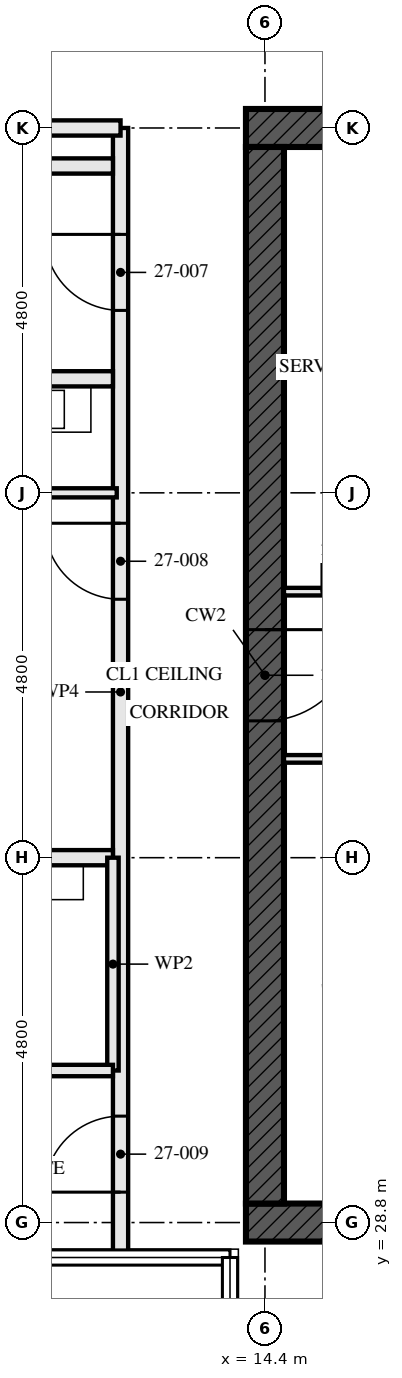
"""IFC4 building model, lengths in metres.
Left out: names, types, materials, properties, quantities, classifications, styles, units other than length and angle.
Written with IfcOpenShell. Run it as: python <this file> out.ifc"""

import sys

from ifc_helpers import new_model, si_unit, direction, frame, frame_2d, origin, place, context, subcontext, project, spatial, rectangle, extrude, element, fill, save


model = new_model("IFC4")
c1 = context("Model", 3, precision=1e-05, world=origin(), true_north=direction((0.0, 1.0)))
c2 = subcontext(c1, "Body", "Model", "MODEL_VIEW")
j1 = project(units=[si_unit("LENGTHUNIT", "METRE"), si_unit("PLANEANGLEUNIT", "RADIAN")], contexts=[c1])
p1 = place(None, origin())
s1 = spatial("IfcSite", under=j1, at=p1, CompositionType="ELEMENT")
p2 = place(p1, origin())
s2 = spatial("IfcBuilding", under=s1, at=p2, CompositionType="ELEMENT")
p3 = place(p2, frame((0.0, 0.0, 101.5)))
s3 = spatial("IfcBuildingStorey", under=s2, at=p3, CompositionType="ELEMENT", Elevation=101.5)
p4 = place(p3, frame((14.15, 28.8, -0.17), z_axis=(0.0, 0.0, 1.0), x_axis=(1.0, 0.0, 0.0)))
e1 = element("IfcWall", 1, at=p4, inside=s3, PredefinedType="SHEAR", context=c2, shape_type="SweptSolid", body=[
    extrude(rectangle(XDim=14.9, YDim=0.5, at=frame_2d((7.45, 0.0))), origin(), (0.0, 0.0, 1.0), 3.5),
])
p5 = place(p4, frame((6.85, 0.0, 0.17)))
e2 = element("IfcOpeningElement", 2, at=p5, cuts=e1, PredefinedType="OPENING", context=c2, shape_type="SweptSolid", body=[
    extrude(rectangle(XDim=1.2, YDim=2.1, at=frame_2d((0.6, 1.05))), frame((0.0, 0.26, 0.0), z_axis=(0.0, -1.0, 0.0), x_axis=(1.0, 0.0, 0.0)), (0.0, 0.0, 1.0), 0.521),
])
p6 = place(p3, frame((29.05, 43.2, -0.17), z_axis=(0.0, 0.0, 1.0), x_axis=(-1.0, 0.0, 0.0)))
e3 = element("IfcWall", 3, at=p6, inside=s3, PredefinedType="SHEAR", context=c2, shape_type="SweptSolid", body=[
    extrude(rectangle(XDim=14.9, YDim=0.5, at=frame_2d((7.45, 0.0))), origin(), (0.0, 0.0, 1.0), 3.5),
])
p7 = place(p6, frame((6.85, 0.0, 0.17)))
e4 = element("IfcOpeningElement", 4, at=p7, cuts=e3, PredefinedType="OPENING", context=c2, shape_type="SweptSolid", body=[
    extrude(rectangle(XDim=1.2, YDim=2.1, at=frame_2d((0.6, 1.05))), frame((0.0, 0.26, 0.0), z_axis=(0.0, -1.0, 0.0), x_axis=(1.0, 0.0, 0.0)), (0.0, 0.0, 1.0), 0.521),
])
p8 = place(p3, frame((14.4, 42.95, -0.17), z_axis=(0.0, 0.0, 1.0), x_axis=(0.0, -1.0, 0.0)))
e5 = element("IfcWall", 5, at=p8, inside=s3, PredefinedType="SHEAR", context=c2, shape_type="SweptSolid", body=[
    extrude(rectangle(XDim=13.9, YDim=0.5, at=frame_2d((6.95, 0.0))), origin(), (0.0, 0.0, 1.0), 3.5),
])
p9 = place(p8, frame((6.35, 0.0, 0.17)))
e6 = element("IfcOpeningElement", 6, at=p9, cuts=e5, PredefinedType="OPENING", context=c2, shape_type="SweptSolid", body=[
    extrude(rectangle(XDim=1.2, YDim=2.1, at=frame_2d((0.6, 1.05))), frame((0.0, 0.26, 0.0), z_axis=(0.0, -1.0, 0.0), x_axis=(1.0, 0.0, 0.0)), (0.0, 0.0, 1.0), 0.521),
])
for number, where, z_axis, x_axis in (
    (7, (7.7, 42.7, 0.0), (0.0, 0.0, 1.0), (1.0, 0.0, 0.0)),
    (8, (7.7, 39.9, 0.0), (0.0, 0.0, 1.0), (1.0, 0.0, 0.0)),
):
    element("IfcWall", number, at=place(p3, frame(where, z_axis=z_axis, x_axis=x_axis)), inside=s3, PredefinedType="SOLIDWALL", context=c2, shape_type="SweptSolid", body=[
        extrude(rectangle(XDim=4.7, YDim=0.2, at=frame_2d((2.35, 0.0))), origin(), (0.0, 0.0, 1.0), 2.99),
    ])
p10 = place(p3, frame((7.8, 38.4, 0.0), z_axis=(0.0, 0.0, 1.0), x_axis=(1.0, 0.0, 0.0)))
e9 = element("IfcWall", 9, at=p10, inside=s3, PredefinedType="PARTITIONING", context=c2, shape_type="SweptSolid", body=[
    extrude(rectangle(XDim=4.65, YDim=0.12, at=frame_2d((2.325, 0.0))), origin(), (0.0, 0.0, 1.0), 2.55),
])
p11 = place(p10, frame((1.875, 0.0, 0.0)))
e10 = element("IfcOpeningElement", 10, at=p11, cuts=e9, PredefinedType="OPENING", context=c2, shape_type="SweptSolid", body=[
    extrude(rectangle(XDim=0.9, YDim=2.1, at=frame_2d((0.45, 1.05))), frame((0.0, 0.071, 0.0), z_axis=(0.0, -1.0, 0.0), x_axis=(1.0, 0.0, 0.0)), (0.0, 0.0, 1.0), 0.141),
])
p12 = place(p3, frame((5.145, 33.6, 0.0), z_axis=(0.0, 0.0, 1.0), x_axis=(1.0, 0.0, 0.0)))
e11 = element("IfcWall", 11, at=p12, inside=s3, PredefinedType="PARTITIONING", context=c2, shape_type="SweptSolid", body=[
    extrude(rectangle(XDim=7.255, YDim=0.2, at=frame_2d((3.627, 0.0))), origin(), (0.0, 0.0, 1.0), 2.55),
])
p13 = place(p3, frame((9.4, 30.8, 0.0), z_axis=(0.0, 0.0, 1.0), x_axis=(1.0, 0.0, 0.0)))
e12 = element("IfcWall", 12, at=p13, inside=s3, PredefinedType="PARTITIONING", context=c2, shape_type="SweptSolid", body=[
    extrude(rectangle(XDim=3.0, YDim=0.15, at=frame_2d((1.5, 0.0))), origin(), (0.0, 0.0, 1.0), 3.33),
])
p14 = place(p3, frame((12.4, 33.6, 0.0), z_axis=(0.0, 0.0, 1.0), x_axis=(0.0, -1.0, 0.0)))
e13 = element("IfcWall", 13, at=p14, inside=s3, PredefinedType="PARTITIONING", context=c2, shape_type="SweptSolid", body=[
    extrude(rectangle(XDim=2.8, YDim=0.15, at=frame_2d((1.4, 0.0))), origin(), (0.0, 0.0, 1.0), 3.33),
])
p15 = place(p3, frame((12.5, 43.2, 0.0), z_axis=(0.0, 0.0, 1.0), x_axis=(0.0, -1.0, 0.0)))
e14 = element("IfcWall", 14, at=p15, inside=s3, PredefinedType="PARTITIONING", context=c2, shape_type="SweptSolid", body=[
    extrude(rectangle(XDim=14.84, YDim=0.2, at=frame_2d((7.42, 0.0))), origin(), (0.0, 0.0, 1.0), 2.32),
])
p16 = place(p15, frame((1.4, 0.0, 0.0)))
e15 = element("IfcOpeningElement", 15, at=p16, cuts=e14, PredefinedType="OPENING", context=c2, shape_type="SweptSolid", body=[
    extrude(rectangle(XDim=1.0, YDim=2.1, at=frame_2d((0.5, 1.05))), frame((0.0, 0.111, 0.0), z_axis=(0.0, -1.0, 0.0), x_axis=(1.0, 0.0, 0.0)), (0.0, 0.0, 1.0), 0.221),
])
p17 = place(p15, frame((5.2, 0.0, 0.0)))
e16 = element("IfcOpeningElement", 16, at=p17, cuts=e14, PredefinedType="OPENING", context=c2, shape_type="SweptSolid", body=[
    extrude(rectangle(XDim=1.0, YDim=2.1, at=frame_2d((0.5, 1.05))), frame((0.0, 0.111, 0.0), z_axis=(0.0, -1.0, 0.0), x_axis=(1.0, 0.0, 0.0)), (0.0, 0.0, 1.0), 0.221),
])
p18 = place(p15, frame((13.0, 0.0, 0.0)))
e17 = element("IfcOpeningElement", 17, at=p18, cuts=e14, PredefinedType="OPENING", context=c2, shape_type="SweptSolid", body=[
    extrude(rectangle(XDim=1.0, YDim=2.1, at=frame_2d((0.5, 1.05))), frame((0.0, 0.111, 0.0), z_axis=(0.0, -1.0, 0.0), x_axis=(1.0, 0.0, 0.0)), (0.0, 0.0, 1.0), 0.221),
])
p19 = place(p3, frame((14.65, 34.9, 0.0), z_axis=(0.0, 0.0, 1.0), x_axis=(1.0, 0.0, 0.0)))
e18 = element("IfcWall", 18, at=p19, inside=s3, PredefinedType="SOLIDWALL", context=c2, shape_type="SweptSolid", body=[
    extrude(rectangle(XDim=5.9, YDim=0.1, at=frame_2d((2.95, 0.0))), origin(), (0.0, 0.0, 1.0), 3.33),
])
p20 = place(p19, frame((1.6, 0.0, 0.0)))
e19 = element("IfcOpeningElement", 19, at=p20, cuts=e18, PredefinedType="OPENING", context=c2, shape_type="SweptSolid", body=[
    extrude(rectangle(XDim=0.7, YDim=2.1, at=frame_2d((0.35, 1.05))), frame((0.0, 0.061, 0.0), z_axis=(0.0, -1.0, 0.0), x_axis=(1.0, 0.0, 0.0)), (0.0, 0.0, 1.0), 0.121),
])
p21 = place(p3, frame((14.65, 37.1, 0.0), z_axis=(0.0, 0.0, 1.0), x_axis=(1.0, 0.0, 0.0)))
e20 = element("IfcWall", 20, at=p21, inside=s3, PredefinedType="SOLIDWALL", context=c2, shape_type="SweptSolid", body=[
    extrude(rectangle(XDim=5.9, YDim=0.1, at=frame_2d((2.95, 0.0))), origin(), (0.0, 0.0, 1.0), 3.33),
])
p22 = place(p21, frame((0.5, 0.0, 0.0)))
e21 = element("IfcOpeningElement", 21, at=p22, cuts=e20, PredefinedType="OPENING", context=c2, shape_type="SweptSolid", body=[
    extrude(rectangle(XDim=0.7, YDim=2.1, at=frame_2d((0.35, 1.05))), frame((0.0, 0.061, 0.0), z_axis=(0.0, -1.0, 0.0), x_axis=(1.0, 0.0, 0.0)), (0.0, 0.0, 1.0), 0.121),
])
p23 = place(p21, frame((1.9, 0.0, 0.0)))
e22 = element("IfcOpeningElement", 22, at=p23, cuts=e20, PredefinedType="OPENING", context=c2, shape_type="SweptSolid", body=[
    extrude(rectangle(XDim=0.9, YDim=2.1, at=frame_2d((0.45, 1.05))), frame((0.0, 0.061, 0.0), z_axis=(0.0, -1.0, 0.0), x_axis=(1.0, 0.0, 0.0)), (0.0, 0.0, 1.0), 0.121),
])
p24 = place(p3, frame((12.5, 43.2, 0.0), z_axis=(0.0, 0.0, 1.0), x_axis=(-1.0, 0.0, 0.0)))
e23 = element("IfcWall", 23, at=p24, inside=s3, PredefinedType="PARTITIONING", context=c2, shape_type="SweptSolid", body=[
    extrude(rectangle(XDim=2.555, YDim=0.2, at=frame_2d((1.277, 0.0))), origin(), (0.0, 0.0, 1.0), 2.32),
])
p25 = place(p16, frame((1.0, 0.0, 0.0), z_axis=(0.0, 0.0, 1.0), x_axis=(-1.0, 0.0, 0.0)))
e24 = element("IfcDoor", 24, at=p25, inside=s3, OperationType="SINGLE_SWING_LEFT", PredefinedType="DOOR", context=c2, shape_type="SweptSolid", body=[
    extrude(rectangle(XDim=1.0, YDim=2.1, at=frame_2d((0.5, 1.05))), frame((0.0, 0.032, 0.0), z_axis=(0.0, -1.0, 0.0), x_axis=(1.0, 0.0, 0.0)), (0.0, 0.0, 1.0), 0.064),
])
fill(e15, e24)
p26 = place(p17, frame((1.0, 0.0, 0.0), z_axis=(0.0, 0.0, 1.0), x_axis=(-1.0, 0.0, 0.0)))
e25 = element("IfcDoor", 25, at=p26, inside=s3, OperationType="SINGLE_SWING_LEFT", PredefinedType="DOOR", context=c2, shape_type="SweptSolid", body=[
    extrude(rectangle(XDim=1.0, YDim=2.1, at=frame_2d((0.5, 1.05))), frame((0.0, 0.027, 0.0), z_axis=(0.0, -1.0, 0.0), x_axis=(1.0, 0.0, 0.0)), (0.0, 0.0, 1.0), 0.054),
])
fill(e16, e25)
p27 = place(p18, frame((1.0, 0.0, 0.0), z_axis=(0.0, 0.0, 1.0), x_axis=(-1.0, 0.0, 0.0)))
e26 = element("IfcDoor", 26, at=p27, inside=s3, OperationType="SINGLE_SWING_RIGHT", PredefinedType="DOOR", context=c2, shape_type="SweptSolid", body=[
    extrude(rectangle(XDim=1.0, YDim=2.1, at=frame_2d((0.5, 1.05))), frame((0.0, 0.027, 0.0), z_axis=(0.0, -1.0, 0.0), x_axis=(1.0, 0.0, 0.0)), (0.0, 0.0, 1.0), 0.054),
])
fill(e17, e26)
p28 = place(p9, origin())
e27 = element("IfcDoor", 27, at=p28, inside=s3, OperationType="SINGLE_SWING_LEFT", PredefinedType="DOOR", context=c2, shape_type="SweptSolid", body=[
    extrude(rectangle(XDim=1.2, YDim=2.1, at=frame_2d((0.6, 1.05))), frame((0.0, 0.027, 0.0), z_axis=(0.0, -1.0, 0.0), x_axis=(1.0, 0.0, 0.0)), (0.0, 0.0, 1.0), 0.054),
])
fill(e6, e27)
save(model, sys.argv[1])
